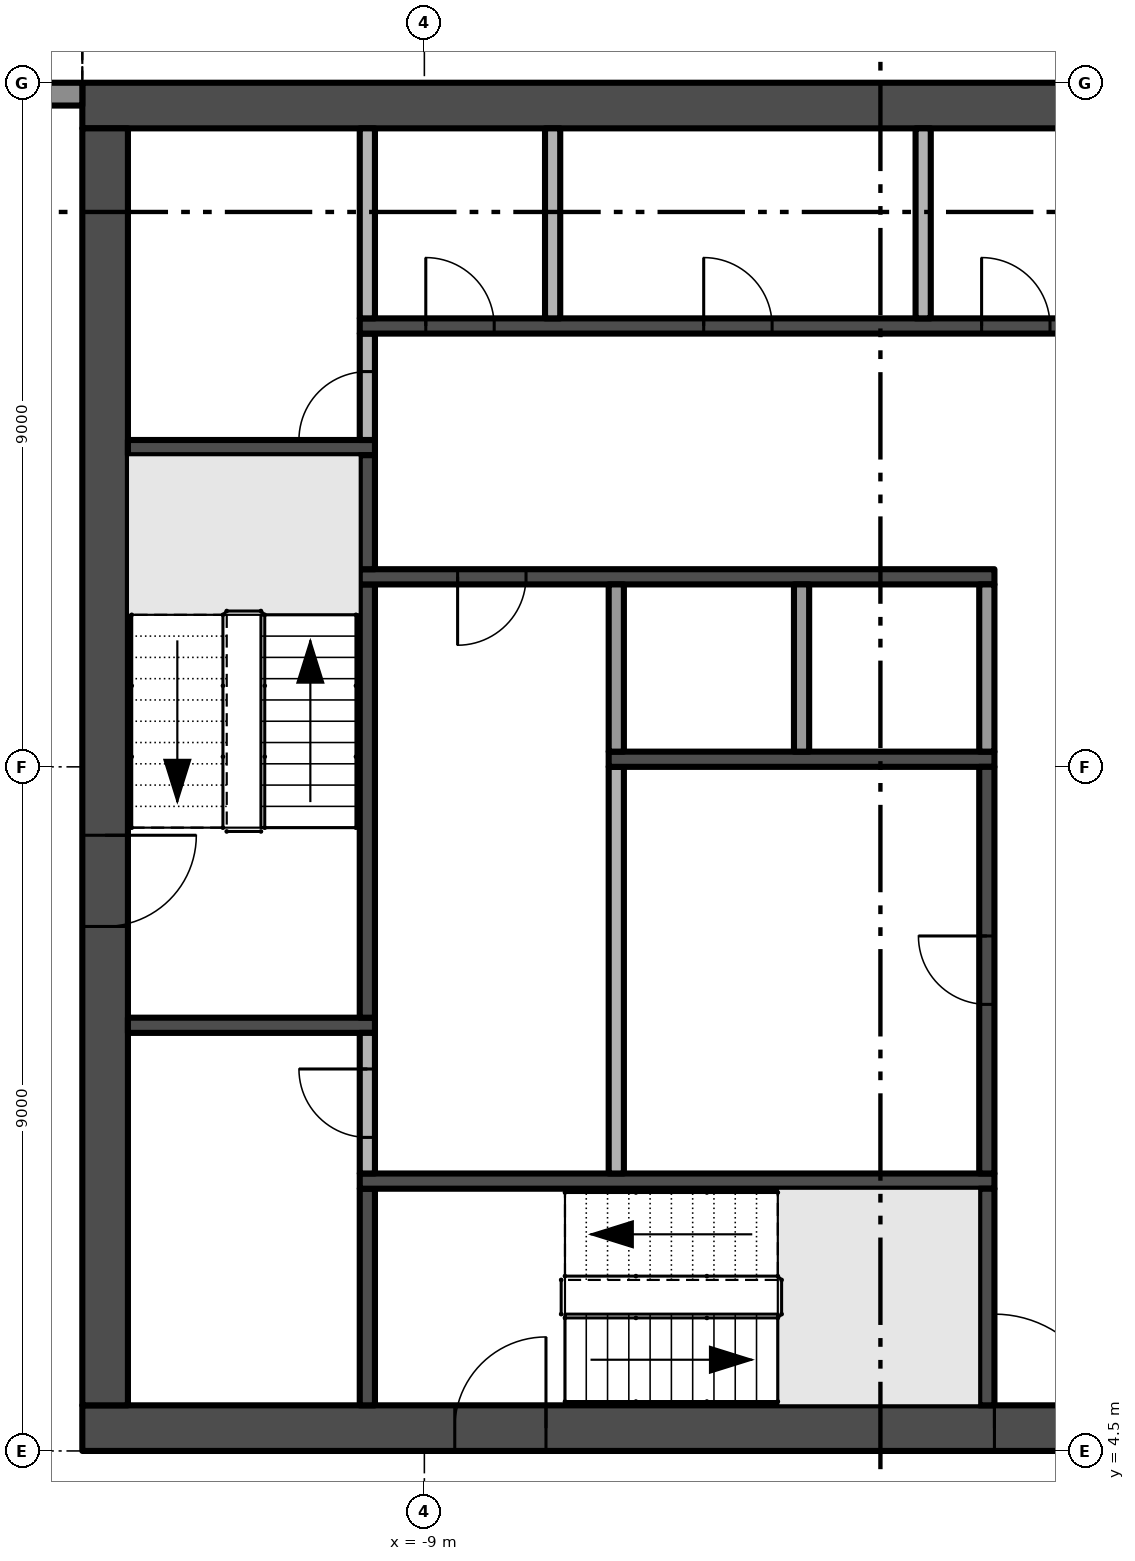
"""IFC4 building model, lengths in metres.
Left out: names, types, materials, properties, quantities, classifications, styles, units other than length and angle.
Written with IfcOpenShell. Run it as: python <this file> out.ifc"""

import sys

from ifc_helpers import new_model, si_unit, direction, frame, frame_2d, origin, place, context, subcontext, project, spatial, polyline, rectangle, outline, extrude, element, fill, save


model = new_model("IFC4")
c1 = context("Model", 3, precision=1e-05, world=origin(), true_north=direction((0.0, 1.0)))
c2 = subcontext(c1, "Body", "Model", "MODEL_VIEW")
j1 = project(units=[si_unit("LENGTHUNIT", "METRE"), si_unit("PLANEANGLEUNIT", "RADIAN")], contexts=[c1])
p1 = place(None, origin())
s1 = spatial("IfcSite", under=j1, at=p1, CompositionType="ELEMENT")
p2 = place(p1, origin())
s2 = spatial("IfcBuilding", under=s1, at=p2, CompositionType="ELEMENT")
p3 = place(p2, frame((0.0, 0.0, 246.4)))
s3 = spatial("IfcBuildingStorey", under=s2, at=p3, CompositionType="ELEMENT", Elevation=246.4)
p4 = place(p3, frame((-13.5, 4.8, -0.3), z_axis=(0.0, 0.0, 1.0), x_axis=(1.0, 0.0, 0.0)))
e1 = element("IfcWall", 1, at=p4, inside=s3, PredefinedType="SHEAR", context=c2, shape_type="SweptSolid", body=[
    extrude(rectangle(XDim=27.0, YDim=0.6, at=frame_2d((13.5, 0.0))), origin(), (0.0, 0.0, 1.0), 3.8),
])
p5 = place(p4, frame((12.0, 0.0, 0.3)))
e2 = element("IfcOpeningElement", 2, at=p5, cuts=e1, PredefinedType="OPENING", context=c2, shape_type="SweptSolid", body=[
    extrude(rectangle(XDim=3.0, YDim=2.4, at=frame_2d((1.5, 1.2))), frame((0.0, 0.31, 0.0), z_axis=(0.0, -1.0, 0.0), x_axis=(1.0, 0.0, 0.0)), (0.0, 0.0, 1.0), 0.62),
])
p6 = place(p4, frame((4.9, 0.0, 0.3)))
e3 = element("IfcOpeningElement", 3, at=p6, cuts=e1, PredefinedType="OPENING", context=c2, shape_type="SweptSolid", body=[
    extrude(rectangle(XDim=1.2, YDim=2.2, at=frame_2d((0.6, 1.1))), frame((0.0, 0.31, 0.0), z_axis=(0.0, -1.0, 0.0), x_axis=(1.0, 0.0, 0.0)), (0.0, 0.0, 1.0), 0.62),
])
p7 = place(p4, frame((20.75, 0.0, 0.3)))
e4 = element("IfcOpeningElement", 4, at=p7, cuts=e1, PredefinedType="OPENING", context=c2, shape_type="SweptSolid", body=[
    extrude(rectangle(XDim=1.5, YDim=2.2, at=frame_2d((0.75, 1.1))), frame((0.0, 0.31, 0.0), z_axis=(0.0, -1.0, 0.0), x_axis=(1.0, 0.0, 0.0)), (0.0, 0.0, 1.0), 0.62),
])
p8 = place(p4, frame((17.4, 0.0, 0.3)))
e5 = element("IfcOpeningElement", 5, at=p8, cuts=e1, PredefinedType="OPENING", context=c2, shape_type="SweptSolid", body=[
    extrude(rectangle(XDim=1.2, YDim=2.2, at=frame_2d((0.6, 1.1))), frame((0.0, 0.31, 0.0), z_axis=(0.0, -1.0, 0.0), x_axis=(1.0, 0.0, 0.0)), (0.0, 0.0, 1.0), 0.62),
])
p9 = place(p3, frame((13.5, 22.2, -0.3), z_axis=(0.0, 0.0, 1.0), x_axis=(-1.0, 0.0, 0.0)))
e6 = element("IfcWall", 6, at=p9, inside=s3, PredefinedType="SHEAR", context=c2, shape_type="SweptSolid", body=[
    extrude(rectangle(XDim=27.0, YDim=0.6, at=frame_2d((13.5, 0.0))), origin(), (0.0, 0.0, 1.0), 3.8),
])
p10 = place(p3, frame((-13.2, 21.9, -0.3), z_axis=(0.0, 0.0, 1.0), x_axis=(0.0, -1.0, 0.0)))
e7 = element("IfcWall", 7, at=p10, inside=s3, PredefinedType="SHEAR", context=c2, shape_type="SweptSolid", body=[
    extrude(rectangle(XDim=16.8, YDim=0.6, at=frame_2d((8.4, 0.0))), origin(), (0.0, 0.0, 1.0), 3.8),
])
p11 = place(p10, frame((9.3, 0.0, 0.3)))
e8 = element("IfcOpeningElement", 8, at=p11, cuts=e7, PredefinedType="OPENING", context=c2, shape_type="SweptSolid", body=[
    extrude(rectangle(XDim=1.2, YDim=2.2, at=frame_2d((0.6, 1.1))), frame((0.0, 0.31, 0.0), z_axis=(0.0, -1.0, 0.0), x_axis=(1.0, 0.0, 0.0)), (0.0, 0.0, 1.0), 0.62),
])
p12 = place(p3, frame((-17.55, 22.35, 0.0), z_axis=(0.0, 0.0, 1.0), x_axis=(1.0, 0.0, 0.0)))
e9 = element("IfcWall", 9, at=p12, inside=s3, PredefinedType="SOLIDWALL", context=c2, shape_type="SweptSolid", body=[
    extrude(rectangle(XDim=4.05, YDim=0.3, at=frame_2d((2.025, 0.0))), origin(), (0.0, 0.0, 1.0), 3.5),
])
p13 = place(p12, frame((0.3, 0.0, 0.0)))
e10 = element("IfcOpeningElement", 10, at=p13, cuts=e9, PredefinedType="OPENING", context=c2, shape_type="SweptSolid", body=[
    extrude(rectangle(XDim=3.2, YDim=2.4, at=frame_2d((1.6, 1.2))), frame((0.0, 0.16, 0.0), z_axis=(0.0, -1.0, 0.0), x_axis=(1.0, 0.0, 0.0)), (0.0, 0.0, 1.0), 0.32),
])
p14 = place(p3, origin())
e11 = element("IfcWall", 11, at=p14, inside=s3, PredefinedType="USERDEFINED", context=c2, shape_type="SweptSolid", body=[
    extrude(outline(polyline([(-13.5, 25.149), (-15.0, 25.485), (-15.375, 25.5), (-16.5, 25.369), (-18.0, 24.845), (-19.5, 24.112), (-21.0, 23.451), (-22.5, 23.115), (-22.445, 22.871), (-20.921, 23.213), (-19.395, 23.885), (-17.904, 24.614), (-16.444, 25.124), (-15.365, 25.249), (-15.033, 25.236), (-13.555, 24.905), (-13.5, 25.149)])), origin(), (0.0, 0.0, 1.0), 0.9),
])
for number, where, z_axis, x_axis in (
    (12, (-12.9, 10.1, 0.0), (0.0, 0.0, 1.0), (1.0, 0.0, 0.0)),
    (13, (-12.9, 17.7, 0.0), (0.0, 0.0, 1.0), (1.0, 0.0, 0.0)),
):
    element("IfcWall", number, at=place(p3, frame(where, z_axis=z_axis, x_axis=x_axis)), inside=s3, PredefinedType="SHEAR", context=c2, shape_type="SweptSolid", body=[
        extrude(rectangle(XDim=3.25, YDim=0.2, at=frame_2d((1.625, 0.0))), origin(), (0.0, 0.0, 1.0), 3.5),
    ])
p15 = place(p3, frame((-9.75, 5.1, 0.0), z_axis=(0.0, 0.0, 1.0), x_axis=(0.0, 1.0, 0.0)))
e14 = element("IfcWall", 14, at=p15, inside=s3, PredefinedType="SHEAR", context=c2, shape_type="SweptSolid", body=[
    extrude(rectangle(XDim=2.85, YDim=0.2, at=frame_2d((1.425, 0.0))), origin(), (0.0, 0.0, 1.0), 3.5),
])
p16 = place(p3, frame((-9.85, 8.05, 0.0), z_axis=(0.0, 0.0, 1.0), x_axis=(1.0, 0.0, 0.0)))
e15 = element("IfcWall", 15, at=p16, inside=s3, PredefinedType="SHEAR", context=c2, shape_type="SweptSolid", body=[
    extrude(rectangle(XDim=8.35, YDim=0.2, at=frame_2d((4.175, 0.0))), origin(), (0.0, 0.0, 1.0), 3.5),
])
p17 = place(p3, frame((-9.75, 8.15, 0.0), z_axis=(0.0, 0.0, 1.0), x_axis=(0.0, 1.0, 0.0)))
e16 = element("IfcWall", 16, at=p17, inside=s3, PredefinedType="PARTITIONING", context=c2, shape_type="SweptSolid", body=[
    extrude(rectangle(XDim=1.85, YDim=0.2, at=frame_2d((0.925, 0.0))), origin(), (0.0, 0.0, 1.0), 3.5),
])
p18 = place(p17, frame((0.475, 0.0, 0.0)))
e17 = element("IfcOpeningElement", 17, at=p18, cuts=e16, PredefinedType="OPENING", context=c2, shape_type="SweptSolid", body=[
    extrude(rectangle(XDim=0.9, YDim=2.1, at=frame_2d((0.45, 1.05))), frame((0.0, 0.11, 0.0), z_axis=(0.0, -1.0, 0.0), x_axis=(1.0, 0.0, 0.0)), (0.0, 0.0, 1.0), 0.22),
])
p19 = place(p3, frame((-9.75, 10.2, 0.0), z_axis=(0.0, 0.0, 1.0), x_axis=(0.0, 1.0, 0.0)))
e18 = element("IfcWall", 18, at=p19, inside=s3, PredefinedType="SHEAR", context=c2, shape_type="SweptSolid", body=[
    extrude(rectangle(XDim=5.7, YDim=0.2, at=frame_2d((2.85, 0.0))), origin(), (0.0, 0.0, 1.0), 3.5),
])
p20 = place(p3, frame((-1.5, 16.0, 0.0), z_axis=(0.0, 0.0, 1.0), x_axis=(-1.0, 0.0, 0.0)))
e19 = element("IfcWall", 19, at=p20, inside=s3, PredefinedType="SHEAR", context=c2, shape_type="SweptSolid", body=[
    extrude(rectangle(XDim=8.35, YDim=0.2, at=frame_2d((4.175, 0.0))), origin(), (0.0, 0.0, 1.0), 3.5),
])
p21 = place(p20, frame((6.162, 0.0, 0.0)))
e20 = element("IfcOpeningElement", 20, at=p21, cuts=e19, PredefinedType="OPENING", context=c2, shape_type="SweptSolid", body=[
    extrude(rectangle(XDim=0.9, YDim=2.1, at=frame_2d((0.45, 1.05))), frame((0.0, 0.11, 0.0), z_axis=(0.0, -1.0, 0.0), x_axis=(1.0, 0.0, 0.0)), (0.0, 0.0, 1.0), 0.22),
])
p22 = place(p3, frame((-9.75, 16.1, 0.0), z_axis=(0.0, 0.0, 1.0), x_axis=(0.0, 1.0, 0.0)))
e21 = element("IfcWall", 21, at=p22, inside=s3, PredefinedType="SHEAR", context=c2, shape_type="SweptSolid", body=[
    extrude(rectangle(XDim=1.5, YDim=0.2, at=frame_2d((0.75, 0.0))), origin(), (0.0, 0.0, 1.0), 3.5),
])
p23 = place(p3, frame((-9.75, 17.8, 0.0), z_axis=(0.0, 0.0, 1.0), x_axis=(0.0, 1.0, 0.0)))
e22 = element("IfcWall", 22, at=p23, inside=s3, PredefinedType="PARTITIONING", context=c2, shape_type="SweptSolid", body=[
    extrude(rectangle(XDim=1.4, YDim=0.2, at=frame_2d((0.7, 0.0))), origin(), (0.0, 0.0, 1.0), 3.5),
])
p24 = place(p23, origin())
e23 = element("IfcOpeningElement", 23, at=p24, cuts=e22, PredefinedType="OPENING", context=c2, shape_type="SweptSolid", body=[
    extrude(rectangle(XDim=0.9, YDim=2.1, at=frame_2d((0.45, 1.05))), frame((0.0, 0.11, 0.0), z_axis=(0.0, -1.0, 0.0), x_axis=(1.0, 0.0, 0.0)), (0.0, 0.0, 1.0), 0.22),
])
p25 = place(p3, frame((-9.85, 19.3, 0.0), z_axis=(0.0, 0.0, 1.0), x_axis=(1.0, 0.0, 0.0)))
e24 = element("IfcWall", 24, at=p25, inside=s3, PredefinedType="SHEAR", context=c2, shape_type="SweptSolid", body=[
    extrude(rectangle(XDim=19.7, YDim=0.2, at=frame_2d((9.85, 0.0))), origin(), (0.0, 0.0, 1.0), 3.5),
])
p26 = place(p25, frame((10.519, 0.0, 0.0)))
e25 = element("IfcOpeningElement", 25, at=p26, cuts=e24, PredefinedType="OPENING", context=c2, shape_type="SweptSolid", body=[
    extrude(rectangle(XDim=1.1, YDim=2.1, at=frame_2d((0.55, 1.05))), frame((0.0, 0.11, 0.0), z_axis=(0.0, -1.0, 0.0), x_axis=(1.0, 0.0, 0.0)), (0.0, 0.0, 1.0), 0.22),
])
p27 = place(p25, frame((12.956, 0.0, 0.0)))
e26 = element("IfcOpeningElement", 26, at=p27, cuts=e24, PredefinedType="OPENING", context=c2, shape_type="SweptSolid", body=[
    extrude(rectangle(XDim=1.1, YDim=2.1, at=frame_2d((0.55, 1.05))), frame((0.0, 0.11, 0.0), z_axis=(0.0, -1.0, 0.0), x_axis=(1.0, 0.0, 0.0)), (0.0, 0.0, 1.0), 0.22),
])
p28 = place(p25, frame((15.394, 0.0, 0.0)))
e27 = element("IfcOpeningElement", 27, at=p28, cuts=e24, PredefinedType="OPENING", context=c2, shape_type="SweptSolid", body=[
    extrude(rectangle(XDim=1.1, YDim=2.1, at=frame_2d((0.55, 1.05))), frame((0.0, 0.11, 0.0), z_axis=(0.0, -1.0, 0.0), x_axis=(1.0, 0.0, 0.0)), (0.0, 0.0, 1.0), 0.22),
])
p29 = place(p25, frame((17.831, 0.0, 0.0)))
e28 = element("IfcOpeningElement", 28, at=p29, cuts=e24, PredefinedType="OPENING", context=c2, shape_type="SweptSolid", body=[
    extrude(rectangle(XDim=1.1, YDim=2.1, at=frame_2d((0.55, 1.05))), frame((0.0, 0.11, 0.0), z_axis=(0.0, -1.0, 0.0), x_axis=(1.0, 0.0, 0.0)), (0.0, 0.0, 1.0), 0.22),
])
p30 = place(p25, frame((0.869, 0.0, 0.0)))
e29 = element("IfcOpeningElement", 29, at=p30, cuts=e24, PredefinedType="OPENING", context=c2, shape_type="SweptSolid", body=[
    extrude(rectangle(XDim=0.9, YDim=2.1, at=frame_2d((0.45, 1.05))), frame((0.0, 0.11, 0.0), z_axis=(0.0, -1.0, 0.0), x_axis=(1.0, 0.0, 0.0)), (0.0, 0.0, 1.0), 0.22),
])
p31 = place(p25, frame((4.525, 0.0, 0.0)))
e30 = element("IfcOpeningElement", 30, at=p31, cuts=e24, PredefinedType="OPENING", context=c2, shape_type="SweptSolid", body=[
    extrude(rectangle(XDim=0.9, YDim=2.1, at=frame_2d((0.45, 1.05))), frame((0.0, 0.11, 0.0), z_axis=(0.0, -1.0, 0.0), x_axis=(1.0, 0.0, 0.0)), (0.0, 0.0, 1.0), 0.22),
])
p32 = place(p25, frame((8.181, 0.0, 0.0)))
e31 = element("IfcOpeningElement", 31, at=p32, cuts=e24, PredefinedType="OPENING", context=c2, shape_type="SweptSolid", body=[
    extrude(rectangle(XDim=0.9, YDim=2.1, at=frame_2d((0.45, 1.05))), frame((0.0, 0.11, 0.0), z_axis=(0.0, -1.0, 0.0), x_axis=(1.0, 0.0, 0.0)), (0.0, 0.0, 1.0), 0.22),
])
for number, where, z_axis, x_axis in (
    (32, (-9.75, 19.4, 0.0), (0.0, 0.0, 1.0), (0.0, 1.0, 0.0)),
    (33, (-7.312, 19.4, 0.0), (0.0, 0.0, 1.0), (0.0, 1.0, 0.0)),
):
    element("IfcWall", number, at=place(p3, frame(where, z_axis=z_axis, x_axis=x_axis)), inside=s3, PredefinedType="PARTITIONING", context=c2, shape_type="SweptSolid", body=[
        extrude(rectangle(XDim=2.5, YDim=0.2, at=frame_2d((1.25, 0.0))), origin(), (0.0, 0.0, 1.0), 3.5),
    ])
p33 = place(p3, frame((-6.475, 8.15, 0.0), z_axis=(0.0, 0.0, 1.0), x_axis=(0.0, 1.0, 0.0)))
e34 = element("IfcWall", 34, at=p33, inside=s3, PredefinedType="PARTITIONING", context=c2, shape_type="SweptSolid", body=[
    extrude(rectangle(XDim=5.35, YDim=0.2, at=frame_2d((2.675, 0.0))), origin(), (0.0, 0.0, 1.0), 3.5),
])
p34 = place(p3, frame((-6.575, 13.6, 0.0), z_axis=(0.0, 0.0, 1.0), x_axis=(1.0, 0.0, 0.0)))
e35 = element("IfcWall", 35, at=p34, inside=s3, PredefinedType="SHEAR", context=c2, shape_type="SweptSolid", body=[
    extrude(rectangle(XDim=5.075, YDim=0.2, at=frame_2d((2.538, 0.0))), origin(), (0.0, 0.0, 1.0), 3.5),
])
for number, where, z_axis, x_axis in (
    (36, (-6.475, 13.7, 0.0), (0.0, 0.0, 1.0), (0.0, 1.0, 0.0)),
    (37, (-4.037, 13.7, 0.0), (0.0, 0.0, 1.0), (0.0, 1.0, 0.0)),
):
    element("IfcWall", number, at=place(p3, frame(where, z_axis=z_axis, x_axis=x_axis)), inside=s3, PredefinedType="PARTITIONING", context=c2, shape_type="SweptSolid", body=[
        extrude(rectangle(XDim=2.2, YDim=0.2, at=frame_2d((1.1, 0.0))), origin(), (0.0, 0.0, 1.0), 3.5),
    ])
p35 = place(p3, frame((-2.438, 19.4, 0.0), z_axis=(0.0, 0.0, 1.0), x_axis=(0.0, 1.0, 0.0)))
e38 = element("IfcWall", 38, at=p35, inside=s3, PredefinedType="PARTITIONING", context=c2, shape_type="SweptSolid", body=[
    extrude(rectangle(XDim=2.5, YDim=0.2, at=frame_2d((1.25, 0.0))), origin(), (0.0, 0.0, 1.0), 3.5),
])
p36 = place(p3, frame((-1.6, 5.1, 0.0), z_axis=(0.0, 0.0, 1.0), x_axis=(0.0, 1.0, 0.0)))
e39 = element("IfcWall", 39, at=p36, inside=s3, PredefinedType="SHEAR", context=c2, shape_type="SweptSolid", body=[
    extrude(rectangle(XDim=2.85, YDim=0.2, at=frame_2d((1.425, 0.0))), origin(), (0.0, 0.0, 1.0), 3.5),
])
p37 = place(p3, frame((-1.6, 8.15, 0.0), z_axis=(0.0, 0.0, 1.0), x_axis=(0.0, 1.0, 0.0)))
e40 = element("IfcWall", 40, at=p37, inside=s3, PredefinedType="SHEAR", context=c2, shape_type="SweptSolid", body=[
    extrude(rectangle(XDim=5.35, YDim=0.2, at=frame_2d((2.675, 0.0))), origin(), (0.0, 0.0, 1.0), 3.5),
])
p38 = place(p37, frame((2.225, 0.0, 0.0)))
e41 = element("IfcOpeningElement", 41, at=p38, cuts=e40, PredefinedType="OPENING", context=c2, shape_type="SweptSolid", body=[
    extrude(rectangle(XDim=0.9, YDim=2.1, at=frame_2d((0.45, 1.05))), frame((0.0, 0.11, 0.0), z_axis=(0.0, -1.0, 0.0), x_axis=(1.0, 0.0, 0.0)), (0.0, 0.0, 1.0), 0.22),
])
p39 = place(p3, frame((-1.6, 13.7, 0.0), z_axis=(0.0, 0.0, 1.0), x_axis=(0.0, 1.0, 0.0)))
e42 = element("IfcWall", 42, at=p39, inside=s3, PredefinedType="PARTITIONING", context=c2, shape_type="SweptSolid", body=[
    extrude(rectangle(XDim=2.2, YDim=0.2, at=frame_2d((1.1, 0.0))), origin(), (0.0, 0.0, 1.0), 3.5),
])
p40 = place(p5, frame((3.0, 0.0, 0.0), z_axis=(0.0, 0.0, 1.0), x_axis=(-1.0, 0.0, 0.0)))
e43 = element("IfcDoor", 43, at=p40, inside=s3, OperationType="DOUBLE_DOOR_SINGLE_SWING", PredefinedType="DOOR", context=c2, shape_type="SweptSolid", body=[
    extrude(rectangle(XDim=3.0, YDim=2.4, at=frame_2d((1.5, 1.2))), frame((0.0, 0.025, 0.0), z_axis=(0.0, -1.0, 0.0), x_axis=(1.0, 0.0, 0.0)), (0.0, 0.0, 1.0), 0.05),
])
fill(e2, e43)
p41 = place(p11, frame((1.2, 0.0, 0.0), z_axis=(0.0, 0.0, 1.0), x_axis=(-1.0, 0.0, 0.0)))
e44 = element("IfcDoor", 44, at=p41, inside=s3, OperationType="SINGLE_SWING_RIGHT", PredefinedType="DOOR", context=c2, shape_type="SweptSolid", body=[
    extrude(rectangle(XDim=1.2, YDim=2.2, at=frame_2d((0.6, 1.1))), frame((0.0, 0.025, 0.0), z_axis=(0.0, -1.0, 0.0), x_axis=(1.0, 0.0, 0.0)), (0.0, 0.0, 1.0), 0.05),
])
fill(e8, e44)
p42 = place(p6, frame((1.2, 0.0, 0.0), z_axis=(0.0, 0.0, 1.0), x_axis=(-1.0, 0.0, 0.0)))
e45 = element("IfcDoor", 45, at=p42, inside=s3, OperationType="SINGLE_SWING_LEFT", PredefinedType="DOOR", context=c2, shape_type="SweptSolid", body=[
    extrude(rectangle(XDim=1.2, YDim=2.2, at=frame_2d((0.6, 1.1))), frame((0.0, 0.025, 0.0), z_axis=(0.0, -1.0, 0.0), x_axis=(1.0, 0.0, 0.0)), (0.0, 0.0, 1.0), 0.05),
])
fill(e3, e45)
p43 = place(p21, origin())
e46 = element("IfcDoor", 46, at=p43, inside=s3, OperationType="SINGLE_SWING_RIGHT", PredefinedType="DOOR", context=c2, shape_type="SweptSolid", body=[
    extrude(rectangle(XDim=0.9, YDim=2.1, at=frame_2d((0.45, 1.05))), frame((0.0, 0.025, 0.0), z_axis=(0.0, -1.0, 0.0), x_axis=(1.0, 0.0, 0.0)), (0.0, 0.0, 1.0), 0.05),
])
fill(e20, e46)
p44 = place(p38, origin())
e47 = element("IfcDoor", 47, at=p44, inside=s3, OperationType="SINGLE_SWING_RIGHT", PredefinedType="DOOR", context=c2, shape_type="SweptSolid", body=[
    extrude(rectangle(XDim=0.9, YDim=2.1, at=frame_2d((0.45, 1.05))), frame((0.0, 0.025, 0.0), z_axis=(0.0, -1.0, 0.0), x_axis=(1.0, 0.0, 0.0)), (0.0, 0.0, 1.0), 0.05),
])
fill(e41, e47)
p45 = place(p24, origin())
e48 = element("IfcDoor", 48, at=p45, inside=s3, OperationType="SINGLE_SWING_LEFT", PredefinedType="DOOR", context=c2, shape_type="SweptSolid", body=[
    extrude(rectangle(XDim=0.9, YDim=2.1, at=frame_2d((0.45, 1.05))), frame((0.0, 0.025, 0.0), z_axis=(0.0, -1.0, 0.0), x_axis=(1.0, 0.0, 0.0)), (0.0, 0.0, 1.0), 0.05),
])
fill(e23, e48)
p46 = place(p30, origin())
e49 = element("IfcDoor", 49, at=p46, inside=s3, OperationType="SINGLE_SWING_LEFT", PredefinedType="DOOR", context=c2, shape_type="SweptSolid", body=[
    extrude(rectangle(XDim=0.9, YDim=2.1, at=frame_2d((0.45, 1.05))), frame((0.0, 0.025, 0.0), z_axis=(0.0, -1.0, 0.0), x_axis=(1.0, 0.0, 0.0)), (0.0, 0.0, 1.0), 0.05),
])
fill(e29, e49)
p47 = place(p31, origin())
e50 = element("IfcDoor", 50, at=p47, inside=s3, OperationType="SINGLE_SWING_LEFT", PredefinedType="DOOR", context=c2, shape_type="SweptSolid", body=[
    extrude(rectangle(XDim=0.9, YDim=2.1, at=frame_2d((0.45, 1.05))), frame((0.0, 0.025, 0.0), z_axis=(0.0, -1.0, 0.0), x_axis=(1.0, 0.0, 0.0)), (0.0, 0.0, 1.0), 0.05),
])
fill(e30, e50)
p48 = place(p32, origin())
e51 = element("IfcDoor", 51, at=p48, inside=s3, OperationType="SINGLE_SWING_LEFT", PredefinedType="DOOR", context=c2, shape_type="SweptSolid", body=[
    extrude(rectangle(XDim=0.9, YDim=2.1, at=frame_2d((0.45, 1.05))), frame((0.0, 0.025, 0.0), z_axis=(0.0, -1.0, 0.0), x_axis=(1.0, 0.0, 0.0)), (0.0, 0.0, 1.0), 0.05),
])
fill(e31, e51)
p49 = place(p18, origin())
e52 = element("IfcDoor", 52, at=p49, inside=s3, OperationType="SINGLE_SWING_RIGHT", PredefinedType="DOOR", context=c2, shape_type="SweptSolid", body=[
    extrude(rectangle(XDim=0.9, YDim=2.1, at=frame_2d((0.45, 1.05))), frame((0.0, 0.025, 0.0), z_axis=(0.0, -1.0, 0.0), x_axis=(1.0, 0.0, 0.0)), (0.0, 0.0, 1.0), 0.05),
])
fill(e17, e52)
save(model, sys.argv[1])
